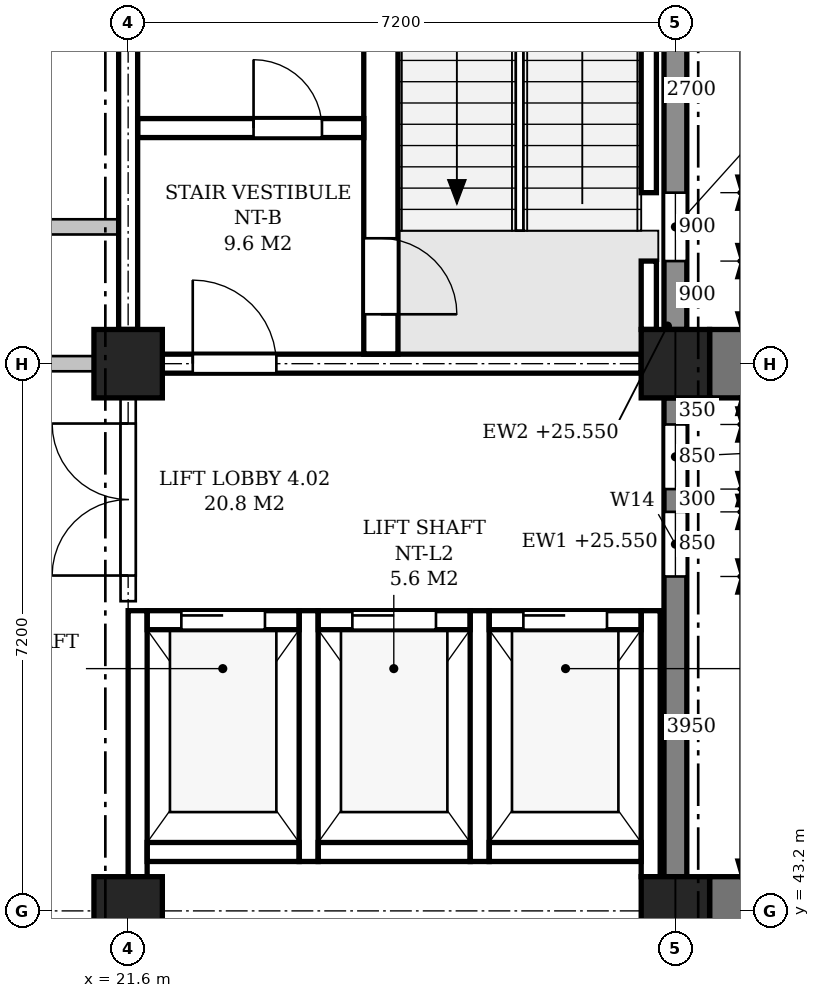
"""IFC4 building model, lengths in metres.
Left out: names, types, materials, properties, quantities, classifications, styles, units other than length and angle.
Written with IfcOpenShell. Run it as: python <this file> out.ifc"""

import sys

from ifc_helpers import new_model, si_unit, direction, frame, frame_2d, origin, origin_2d, place, context, subcontext, project, spatial, polyline, rectangle, outline, extrude, element, fill, save


model = new_model("IFC4")
c1 = context("Model", 3, precision=1e-05, world=origin(), true_north=direction((0.0, 1.0)))
c2 = subcontext(c1, "Body", "Model", "MODEL_VIEW")
j1 = project(units=[si_unit("LENGTHUNIT", "METRE"), si_unit("PLANEANGLEUNIT", "RADIAN")], contexts=[c1])
p1 = place(None, origin())
s1 = spatial("IfcSite", under=j1, at=p1, CompositionType="ELEMENT")
p2 = place(p1, origin())
s2 = spatial("IfcBuilding", under=s1, at=p2, CompositionType="ELEMENT")
p3 = place(p2, frame((0.0, 0.0, 21.6)))
s3 = spatial("IfcBuildingStorey", under=s2, at=p3, CompositionType="ELEMENT", Elevation=21.6)
for number, where, z_axis, x_axis in (
    (1, (21.6, 43.2, 0.0), (0.0, 0.0, 1.0), (1.0, 0.0, 0.0)),
    (2, (21.6, 50.4, 0.0), (0.0, 0.0, 1.0), (1.0, 0.0, 0.0)),
    (3, (28.8, 43.2, 0.0), (0.0, 0.0, 1.0), (1.0, 0.0, 0.0)),
    (4, (28.8, 50.4, 0.0), (0.0, 0.0, 1.0), (1.0, 0.0, 0.0)),
):
    element("IfcColumn", number, at=place(p3, frame(where, z_axis=z_axis, x_axis=x_axis)), inside=s3, PredefinedType="COLUMN", context=c2, shape_type="SweptSolid", body=[
        extrude(rectangle(XDim=0.9, YDim=0.9, at=origin_2d()), origin(), (0.0, 0.0, 1.0), 4.8),
    ])
p4 = place(p3, frame((28.8, 43.65, 0.0), z_axis=(0.0, 0.0, 1.0), x_axis=(0.0, 1.0, 0.0)))
e5 = element("IfcWall", 5, at=p4, inside=s3, PredefinedType="STANDARD", context=c2, shape_type="SweptSolid", body=[
    extrude(rectangle(XDim=6.3, YDim=0.3, at=frame_2d((3.15, 0.0))), origin(), (0.0, 0.0, 1.0), 3.95),
])
p5 = place(p4, frame((3.95, 0.0, 0.9)))
e6 = element("IfcOpeningElement", 6, at=p5, cuts=e5, PredefinedType="OPENING", context=c2, shape_type="SweptSolid", body=[
    extrude(outline(polyline([(0.0, 0.0), (0.85, 0.0), (0.85, 2.05), (0.425, 2.5), (0.0, 2.05), (0.0, 0.0)])), frame((0.0, 0.16, 0.0), z_axis=(0.0, -1.0, 0.0), x_axis=(1.0, 0.0, 0.0)), (0.0, 0.0, 1.0), 0.32),
])
p6 = place(p4, frame((5.1, 0.0, 0.9)))
e7 = element("IfcOpeningElement", 7, at=p6, cuts=e5, PredefinedType="OPENING", context=c2, shape_type="SweptSolid", body=[
    extrude(outline(polyline([(0.0, 0.0), (0.85, 0.0), (0.85, 2.05), (0.425, 2.5), (0.0, 2.05), (0.0, 0.0)])), frame((0.0, 0.16, 0.0), z_axis=(0.0, -1.0, 0.0), x_axis=(1.0, 0.0, 0.0)), (0.0, 0.0, 1.0), 0.32),
])
p7 = place(p3, frame((28.8, 50.85, 0.0), z_axis=(0.0, 0.0, 1.0), x_axis=(0.0, 1.0, 0.0)))
e8 = element("IfcWall", 8, at=p7, inside=s3, PredefinedType="STANDARD", context=c2, shape_type="SweptSolid", body=[
    extrude(rectangle(XDim=6.3, YDim=0.3, at=frame_2d((3.15, 0.0))), origin(), (0.0, 0.0, 1.0), 3.95),
])
p8 = place(p7, frame((0.9, 0.0, 0.9)))
e9 = element("IfcOpeningElement", 9, at=p8, cuts=e8, PredefinedType="OPENING", context=c2, shape_type="SweptSolid", body=[
    extrude(outline(polyline([(0.0, 0.0), (0.9, 0.0), (0.9, 2.05), (0.45, 2.5), (0.0, 2.05), (0.0, 0.0)])), frame((0.0, 0.16, 0.0), z_axis=(0.0, -1.0, 0.0), x_axis=(1.0, 0.0, 0.0)), (0.0, 0.0, 1.0), 0.32),
])
p9 = place(p7, frame((4.5, 0.0, 0.9)))
e10 = element("IfcOpeningElement", 10, at=p9, cuts=e8, PredefinedType="OPENING", context=c2, shape_type="SweptSolid", body=[
    extrude(outline(polyline([(0.0, 0.0), (0.9, 0.0), (0.9, 2.05), (0.45, 2.5), (0.0, 2.05), (0.0, 0.0)])), frame((0.0, 0.16, 0.0), z_axis=(0.0, -1.0, 0.0), x_axis=(1.0, 0.0, 0.0)), (0.0, 0.0, 1.0), 0.32),
])
for number, where, z_axis, x_axis in (
    (11, (29.25, 43.2, -0.25), (0.0, 0.0, 1.0), (1.0, 0.0, 0.0)),
    (12, (29.25, 50.4, -0.25), (0.0, 0.0, 1.0), (1.0, 0.0, 0.0)),
):
    element("IfcWall", number, at=place(p3, frame(where, z_axis=z_axis, x_axis=x_axis)), inside=s3, PredefinedType="POLYGONAL", context=c2, shape_type="SweptSolid", body=[
        extrude(outline(polyline([(1.1, 0.0), (1.1, 19.2), (0.0, 19.2), (0.0, 0.0), (1.1, 0.0)])), frame((0.0, 0.45, 0.0), z_axis=(0.0, -1.0, 0.0), x_axis=(1.0, 0.0, 0.0)), (0.0, 0.0, 1.0), 0.9),
    ])
p10 = place(p3, frame((22.05, 50.4, 0.0), z_axis=(0.0, 0.0, 1.0), x_axis=(1.0, 0.0, 0.0)))
e13 = element("IfcWall", 13, at=p10, inside=s3, PredefinedType="SHEAR", context=c2, shape_type="SweptSolid", body=[
    extrude(rectangle(XDim=6.3, YDim=0.25, at=frame_2d((3.15, 0.0))), origin(), (0.0, 0.0, 1.0), 3.8),
])
p11 = place(p10, frame((0.4, 0.0, 0.0)))
e14 = element("IfcOpeningElement", 14, at=p11, cuts=e13, PredefinedType="OPENING", context=c2, shape_type="SweptSolid", body=[
    extrude(rectangle(XDim=1.1, YDim=2.1, at=frame_2d((0.55, 1.05))), frame((0.0, 0.135, 0.0), z_axis=(0.0, -1.0, 0.0), x_axis=(1.0, 0.0, 0.0)), (0.0, 0.0, 1.0), 0.27),
])
p12 = place(p3, frame((21.6, 50.85, 0.0), z_axis=(0.0, 0.0, 1.0), x_axis=(0.0, 1.0, 0.0)))
e15 = element("IfcWall", 15, at=p12, inside=s3, PredefinedType="SHEAR", context=c2, shape_type="SweptSolid", body=[
    extrude(rectangle(XDim=6.3, YDim=0.25, at=frame_2d((3.15, 0.0))), origin(), (0.0, 0.0, 1.0), 3.8),
])
p13 = place(p3, frame((28.45, 50.85, -0.25), z_axis=(0.0, 0.0, 1.0), x_axis=(0.0, 1.0, 0.0)))
e16 = element("IfcWall", 16, at=p13, inside=s3, PredefinedType="SHEAR", context=c2, shape_type="SweptSolid", body=[
    extrude(rectangle(XDim=0.9, YDim=0.2, at=frame_2d((0.45, 0.0))), origin(), (0.0, 0.0, 1.0), 4.8),
])
p14 = place(p3, frame((28.45, 52.65, -0.25), z_axis=(0.0, 0.0, 1.0), x_axis=(0.0, 1.0, 0.0)))
e17 = element("IfcWall", 17, at=p14, inside=s3, PredefinedType="SHEAR", context=c2, shape_type="SweptSolid", body=[
    extrude(rectangle(XDim=2.7, YDim=0.2, at=frame_2d((1.35, 0.0))), origin(), (0.0, 0.0, 1.0), 4.8),
])
p15 = place(p3, frame((24.925, 50.525, 0.0), z_axis=(0.0, 0.0, 1.0), x_axis=(0.0, 1.0, 0.0)))
e18 = element("IfcWall", 18, at=p15, inside=s3, PredefinedType="SHEAR", context=c2, shape_type="SweptSolid", body=[
    extrude(rectangle(XDim=6.85, YDim=0.45, at=frame_2d((3.425, 0.0))), origin(), (0.0, 0.0, 1.0), 4.55),
])
p16 = place(p15, frame((0.525, 0.0, 0.0)))
e19 = element("IfcOpeningElement", 19, at=p16, cuts=e18, PredefinedType="OPENING", context=c2, shape_type="SweptSolid", body=[
    extrude(rectangle(XDim=1.0, YDim=2.1, at=frame_2d((0.5, 1.05))), frame((0.0, 0.235, 0.0), z_axis=(0.0, -1.0, 0.0), x_axis=(1.0, 0.0, 0.0)), (0.0, 0.0, 1.0), 0.47),
])
p17 = place(p3, frame((21.725, 53.5, 0.0), z_axis=(0.0, 0.0, 1.0), x_axis=(1.0, 0.0, 0.0)))
e20 = element("IfcWall", 20, at=p17, inside=s3, PredefinedType="SHEAR", context=c2, shape_type="SweptSolid", body=[
    extrude(rectangle(XDim=2.975, YDim=0.25, at=frame_2d((1.487, 0.0))), origin(), (0.0, 0.0, 1.0), 4.55),
])
p18 = place(p17, frame((1.525, 0.0, 0.0)))
e21 = element("IfcOpeningElement", 21, at=p18, cuts=e20, PredefinedType="OPENING", context=c2, shape_type="SweptSolid", body=[
    extrude(rectangle(XDim=0.9, YDim=2.1, at=frame_2d((0.45, 1.05))), frame((0.0, 0.135, 0.0), z_axis=(0.0, -1.0, 0.0), x_axis=(1.0, 0.0, 0.0)), (0.0, 0.0, 1.0), 0.27),
])
p19 = place(p3, frame((21.725, 43.65, -0.25), z_axis=(0.0, 0.0, 1.0), x_axis=(0.0, 1.0, 0.0)))
e22 = element("IfcWall", 22, at=p19, inside=s3, PredefinedType="SHEAR", context=c2, shape_type="SweptSolid", body=[
    extrude(rectangle(XDim=3.5, YDim=0.25, at=frame_2d((1.75, 0.0))), origin(), (0.0, 0.0, 1.0), 4.05),
])
for number, where, z_axis, x_axis in (
    (23, (23.975, 43.85, -0.25), (0.0, 0.0, 1.0), (0.0, 1.0, 0.0)),
    (24, (26.225, 43.85, -0.25), (0.0, 0.0, 1.0), (0.0, 1.0, 0.0)),
):
    element("IfcWall", number, at=place(p3, frame(where, z_axis=z_axis, x_axis=x_axis)), inside=s3, PredefinedType="SHEAR", context=c2, shape_type="SweptSolid", body=[
        extrude(rectangle(XDim=3.3, YDim=0.25, at=frame_2d((1.65, 0.0))), origin(), (0.0, 0.0, 1.0), 4.8),
    ])
p20 = place(p3, frame((28.475, 43.65, -0.25), z_axis=(0.0, 0.0, 1.0), x_axis=(0.0, 1.0, 0.0)))
e25 = element("IfcWall", 25, at=p20, inside=s3, PredefinedType="SHEAR", context=c2, shape_type="SweptSolid", body=[
    extrude(rectangle(XDim=3.5, YDim=0.25, at=frame_2d((1.75, 0.0))), origin(), (0.0, 0.0, 1.0), 4.8),
])
p21 = place(p3, frame((21.85, 47.025, -0.25), z_axis=(0.0, 0.0, 1.0), x_axis=(1.0, 0.0, 0.0)))
e26 = element("IfcWall", 26, at=p21, inside=s3, PredefinedType="SHEAR", context=c2, shape_type="SweptSolid", body=[
    extrude(rectangle(XDim=2.0, YDim=0.25, at=frame_2d((1.0, 0.0))), origin(), (0.0, 0.0, 1.0), 4.8),
])
p22 = place(p21, frame((0.45, 0.0, 0.25)))
e27 = element("IfcOpeningElement", 27, at=p22, cuts=e26, PredefinedType="OPENING", context=c2, shape_type="SweptSolid", body=[
    extrude(rectangle(XDim=1.1, YDim=2.1, at=frame_2d((0.55, 1.05))), frame((0.0, 0.135, 0.0), z_axis=(0.0, -1.0, 0.0), x_axis=(1.0, 0.0, 0.0)), (0.0, 0.0, 1.0), 0.27),
])
p23 = place(p3, frame((21.85, 43.975, -0.25), z_axis=(0.0, 0.0, 1.0), x_axis=(1.0, 0.0, 0.0)))
e28 = element("IfcWall", 28, at=p23, inside=s3, PredefinedType="SHEAR", context=c2, shape_type="SweptSolid", body=[
    extrude(rectangle(XDim=2.0, YDim=0.25, at=frame_2d((1.0, 0.0))), origin(), (0.0, 0.0, 1.0), 4.8),
])
p24 = place(p3, frame((24.1, 47.025, -0.25), z_axis=(0.0, 0.0, 1.0), x_axis=(1.0, 0.0, 0.0)))
e29 = element("IfcWall", 29, at=p24, inside=s3, PredefinedType="SHEAR", context=c2, shape_type="SweptSolid", body=[
    extrude(rectangle(XDim=2.0, YDim=0.25, at=frame_2d((1.0, 0.0))), origin(), (0.0, 0.0, 1.0), 4.8),
])
p25 = place(p24, frame((0.45, 0.0, 0.25)))
e30 = element("IfcOpeningElement", 30, at=p25, cuts=e29, PredefinedType="OPENING", context=c2, shape_type="SweptSolid", body=[
    extrude(rectangle(XDim=1.1, YDim=2.1, at=frame_2d((0.55, 1.05))), frame((0.0, 0.135, 0.0), z_axis=(0.0, -1.0, 0.0), x_axis=(1.0, 0.0, 0.0)), (0.0, 0.0, 1.0), 0.27),
])
p26 = place(p3, frame((24.1, 43.975, -0.25), z_axis=(0.0, 0.0, 1.0), x_axis=(1.0, 0.0, 0.0)))
e31 = element("IfcWall", 31, at=p26, inside=s3, PredefinedType="SHEAR", context=c2, shape_type="SweptSolid", body=[
    extrude(rectangle(XDim=2.0, YDim=0.25, at=frame_2d((1.0, 0.0))), origin(), (0.0, 0.0, 1.0), 4.8),
])
p27 = place(p3, frame((26.35, 47.025, -0.25), z_axis=(0.0, 0.0, 1.0), x_axis=(1.0, 0.0, 0.0)))
e32 = element("IfcWall", 32, at=p27, inside=s3, PredefinedType="SHEAR", context=c2, shape_type="SweptSolid", body=[
    extrude(rectangle(XDim=2.0, YDim=0.25, at=frame_2d((1.0, 0.0))), origin(), (0.0, 0.0, 1.0), 4.8),
])
p28 = place(p27, frame((0.45, 0.0, 0.25)))
e33 = element("IfcOpeningElement", 33, at=p28, cuts=e32, PredefinedType="OPENING", context=c2, shape_type="SweptSolid", body=[
    extrude(rectangle(XDim=1.1, YDim=2.1, at=frame_2d((0.55, 1.05))), frame((0.0, 0.135, 0.0), z_axis=(0.0, -1.0, 0.0), x_axis=(1.0, 0.0, 0.0)), (0.0, 0.0, 1.0), 0.27),
])
p29 = place(p3, frame((26.35, 43.975, -0.25), z_axis=(0.0, 0.0, 1.0), x_axis=(1.0, 0.0, 0.0)))
e34 = element("IfcWall", 34, at=p29, inside=s3, PredefinedType="SHEAR", context=c2, shape_type="SweptSolid", body=[
    extrude(rectangle(XDim=2.0, YDim=0.25, at=frame_2d((1.0, 0.0))), origin(), (0.0, 0.0, 1.0), 4.8),
])
p30 = place(p3, frame((14.85, 50.4, 0.0), z_axis=(0.0, 0.0, 1.0), x_axis=(1.0, 0.0, 0.0)))
e35 = element("IfcWall", 35, at=p30, inside=s3, PredefinedType="PARTITIONING", context=c2, shape_type="SweptSolid", body=[
    extrude(rectangle(XDim=6.3, YDim=0.2, at=frame_2d((3.15, 0.0))), origin(), (0.0, 0.0, 1.0), 3.8),
])
p31 = place(p30, frame((4.225, 0.0, 0.0)))
e36 = element("IfcOpeningElement", 36, at=p31, cuts=e35, PredefinedType="OPENING", context=c2, shape_type="SweptSolid", body=[
    extrude(rectangle(XDim=1.0, YDim=2.1, at=frame_2d((0.5, 1.05))), frame((0.0, 0.11, 0.0), z_axis=(0.0, -1.0, 0.0), x_axis=(1.0, 0.0, 0.0)), (0.0, 0.0, 1.0), 0.22),
])
p32 = place(p3, frame((7.325, 52.2, 0.0), z_axis=(0.0, 0.0, 1.0), x_axis=(1.0, 0.0, 0.0)))
e37 = element("IfcWall", 37, at=p32, inside=s3, PredefinedType="PARTITIONING", context=c2, shape_type="SweptSolid", body=[
    extrude(outline(polyline([(0.0, 0.0), (14.15, 0.0), (14.15, 3.8), (14.025, 3.8), (14.025, 4.55), (7.325, 4.55), (7.325, 3.8), (6.825, 3.8), (6.825, 4.55), (0.125, 4.55), (0.125, 3.8), (0.0, 3.8), (0.0, 0.0)])), frame((0.0, 0.1, 0.0), z_axis=(0.0, -1.0, 0.0), x_axis=(1.0, 0.0, 0.0)), (0.0, 0.0, 1.0), 0.2),
])
p33 = place(p32, frame((1.238, 0.0, 0.0)))
e38 = element("IfcOpeningElement", 38, at=p33, cuts=e37, PredefinedType="OPENING", context=c2, shape_type="SweptSolid", body=[
    extrude(rectangle(XDim=1.0, YDim=2.1, at=frame_2d((0.5, 1.05))), frame((0.0, 0.11, 0.0), z_axis=(0.0, -1.0, 0.0), x_axis=(1.0, 0.0, 0.0)), (0.0, 0.0, 1.0), 0.22),
])
p34 = place(p32, frame((4.775, 0.0, 0.0)))
e39 = element("IfcOpeningElement", 39, at=p34, cuts=e37, PredefinedType="OPENING", context=c2, shape_type="SweptSolid", body=[
    extrude(rectangle(XDim=1.0, YDim=2.1, at=frame_2d((0.5, 1.05))), frame((0.0, 0.11, 0.0), z_axis=(0.0, -1.0, 0.0), x_axis=(1.0, 0.0, 0.0)), (0.0, 0.0, 1.0), 0.22),
])
p35 = place(p32, frame((8.375, 0.0, 0.0)))
e40 = element("IfcOpeningElement", 40, at=p35, cuts=e37, PredefinedType="OPENING", context=c2, shape_type="SweptSolid", body=[
    extrude(rectangle(XDim=1.0, YDim=2.1, at=frame_2d((0.5, 1.05))), frame((0.0, 0.11, 0.0), z_axis=(0.0, -1.0, 0.0), x_axis=(1.0, 0.0, 0.0)), (0.0, 0.0, 1.0), 0.22),
])
p36 = place(p32, frame((11.913, 0.0, 0.0)))
e41 = element("IfcOpeningElement", 41, at=p36, cuts=e37, PredefinedType="OPENING", context=c2, shape_type="SweptSolid", body=[
    extrude(rectangle(XDim=1.0, YDim=2.1, at=frame_2d((0.5, 1.05))), frame((0.0, 0.11, 0.0), z_axis=(0.0, -1.0, 0.0), x_axis=(1.0, 0.0, 0.0)), (0.0, 0.0, 1.0), 0.22),
])
p37 = place(p3, frame((21.6, 47.275, 0.0), z_axis=(0.0, 0.0, 1.0), x_axis=(0.0, 1.0, 0.0)))
e42 = element("IfcWall", 42, at=p37, inside=s3, PredefinedType="PARTITIONING", context=c2, shape_type="SweptSolid", body=[
    extrude(rectangle(XDim=2.675, YDim=0.2, at=frame_2d((1.337, 0.0))), origin(), (0.0, 0.0, 1.0), 3.8),
])
p38 = place(p37, frame((0.337, 0.0, 0.0)))
e43 = element("IfcOpeningElement", 43, at=p38, cuts=e42, PredefinedType="OPENING", context=c2, shape_type="SweptSolid", body=[
    extrude(rectangle(XDim=2.0, YDim=2.4, at=frame_2d((1.0, 1.2))), frame((0.0, 0.11, 0.0), z_axis=(0.0, -1.0, 0.0), x_axis=(1.0, 0.0, 0.0)), (0.0, 0.0, 1.0), 0.22),
])
p39 = place(p5, origin())
e44 = element("IfcWindow", 44, at=p39, inside=s3, PartitioningType="SINGLE_PANEL", PredefinedType="WINDOW", context=c2, shape_type="SweptSolid", body=[
    extrude(outline(polyline([(0.0, 0.0), (0.85, 0.0), (0.85, 2.05), (0.425, 2.5), (0.0, 2.05), (0.0, 0.0)])), frame((0.0, 0.03, 0.0), z_axis=(0.0, -1.0, 0.0), x_axis=(1.0, 0.0, 0.0)), (0.0, 0.0, 1.0), 0.06),
])
fill(e6, e44)
p40 = place(p6, origin())
e45 = element("IfcWindow", 45, at=p40, inside=s3, PartitioningType="SINGLE_PANEL", PredefinedType="WINDOW", context=c2, shape_type="SweptSolid", body=[
    extrude(outline(polyline([(0.0, 0.0), (0.85, 0.0), (0.85, 2.05), (0.425, 2.5), (0.0, 2.05), (0.0, 0.0)])), frame((0.0, 0.03, 0.0), z_axis=(0.0, -1.0, 0.0), x_axis=(1.0, 0.0, 0.0)), (0.0, 0.0, 1.0), 0.06),
])
fill(e7, e45)
p41 = place(p8, origin())
e46 = element("IfcWindow", 46, at=p41, inside=s3, PartitioningType="SINGLE_PANEL", PredefinedType="WINDOW", context=c2, shape_type="SweptSolid", body=[
    extrude(outline(polyline([(0.0, 0.0), (0.9, 0.0), (0.9, 2.05), (0.45, 2.5), (0.0, 2.05), (0.0, 0.0)])), frame((0.0, 0.03, 0.0), z_axis=(0.0, -1.0, 0.0), x_axis=(1.0, 0.0, 0.0)), (0.0, 0.0, 1.0), 0.06),
])
fill(e9, e46)
p42 = place(p16, frame((1.0, 0.0, 0.0), z_axis=(0.0, 0.0, 1.0), x_axis=(-1.0, 0.0, 0.0)))
e47 = element("IfcDoor", 47, at=p42, inside=s3, OperationType="SINGLE_SWING_RIGHT", PredefinedType="DOOR", context=c2, shape_type="SweptSolid", body=[
    extrude(rectangle(XDim=1.0, YDim=2.1, at=frame_2d((0.5, 1.05))), frame((0.0, 0.025, 0.0), z_axis=(0.0, -1.0, 0.0), x_axis=(1.0, 0.0, 0.0)), (0.0, 0.0, 1.0), 0.05),
])
fill(e19, e47)
p43 = place(p11, origin())
e48 = element("IfcDoor", 48, at=p43, inside=s3, OperationType="SINGLE_SWING_LEFT", PredefinedType="DOOR", context=c2, shape_type="SweptSolid", body=[
    extrude(rectangle(XDim=1.1, YDim=2.1, at=frame_2d((0.55, 1.05))), frame((0.0, 0.025, 0.0), z_axis=(0.0, -1.0, 0.0), x_axis=(1.0, 0.0, 0.0)), (0.0, 0.0, 1.0), 0.05),
])
fill(e14, e48)
p44 = place(p18, origin())
e49 = element("IfcDoor", 49, at=p44, inside=s3, OperationType="SINGLE_SWING_LEFT", PredefinedType="DOOR", context=c2, shape_type="SweptSolid", body=[
    extrude(rectangle(XDim=0.9, YDim=2.1, at=frame_2d((0.45, 1.05))), frame((0.0, 0.025, 0.0), z_axis=(0.0, -1.0, 0.0), x_axis=(1.0, 0.0, 0.0)), (0.0, 0.0, 1.0), 0.05),
])
fill(e21, e49)
p45 = place(p22, origin())
e50 = element("IfcDoor", 50, at=p45, inside=s3, OperationType="SLIDING_TO_LEFT", PredefinedType="DOOR", context=c2, shape_type="SweptSolid", body=[
    extrude(rectangle(XDim=1.1, YDim=2.1, at=frame_2d((0.55, 1.05))), frame((0.0, 0.025, 0.0), z_axis=(0.0, -1.0, 0.0), x_axis=(1.0, 0.0, 0.0)), (0.0, 0.0, 1.0), 0.05),
])
fill(e27, e50)
p46 = place(p25, origin())
e51 = element("IfcDoor", 51, at=p46, inside=s3, OperationType="SLIDING_TO_LEFT", PredefinedType="DOOR", context=c2, shape_type="SweptSolid", body=[
    extrude(rectangle(XDim=1.1, YDim=2.1, at=frame_2d((0.55, 1.05))), frame((0.0, 0.025, 0.0), z_axis=(0.0, -1.0, 0.0), x_axis=(1.0, 0.0, 0.0)), (0.0, 0.0, 1.0), 0.05),
])
fill(e30, e51)
p47 = place(p28, origin())
e52 = element("IfcDoor", 52, at=p47, inside=s3, OperationType="SLIDING_TO_LEFT", PredefinedType="DOOR", context=c2, shape_type="SweptSolid", body=[
    extrude(rectangle(XDim=1.1, YDim=2.1, at=frame_2d((0.55, 1.05))), frame((0.0, 0.025, 0.0), z_axis=(0.0, -1.0, 0.0), x_axis=(1.0, 0.0, 0.0)), (0.0, 0.0, 1.0), 0.05),
])
fill(e33, e52)
p48 = place(p38, origin())
e53 = element("IfcDoor", 53, at=p48, inside=s3, OperationType="DOUBLE_DOOR_SINGLE_SWING", PredefinedType="DOOR", context=c2, shape_type="SweptSolid", body=[
    extrude(rectangle(XDim=2.0, YDim=2.4, at=frame_2d((1.0, 1.2))), frame((0.0, 0.025, 0.0), z_axis=(0.0, -1.0, 0.0), x_axis=(1.0, 0.0, 0.0)), (0.0, 0.0, 1.0), 0.05),
])
fill(e43, e53)
save(model, sys.argv[1])
